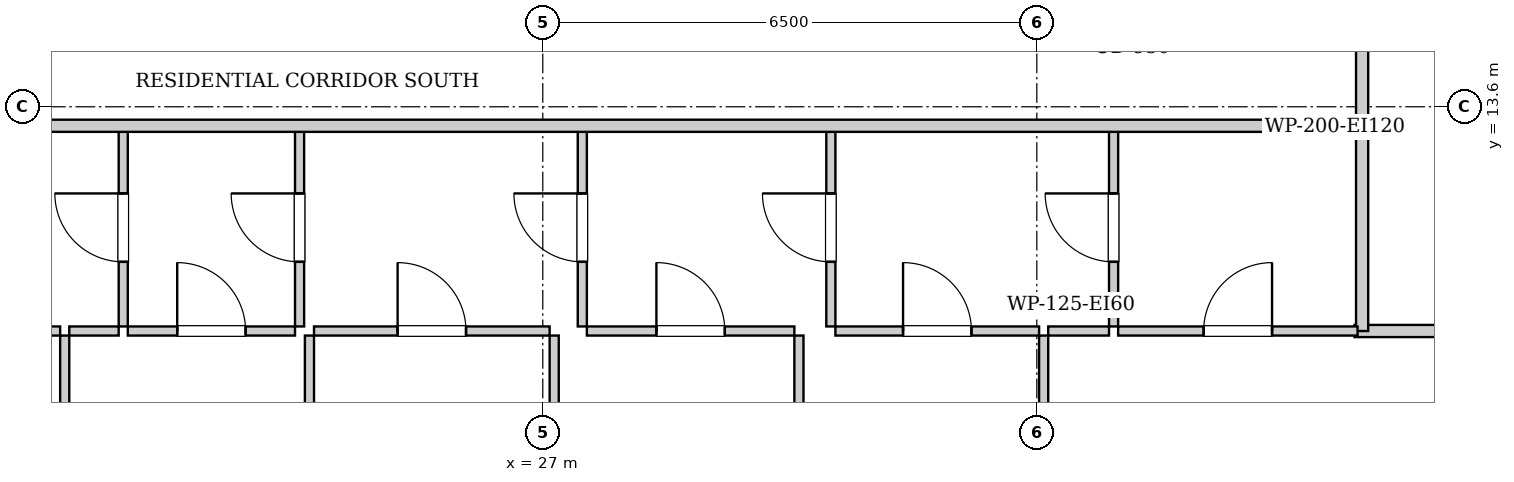
"""IFC4 building model, lengths in metres.
Left out: names, types, materials, properties, quantities, classifications, styles, units other than length and angle.
Written with IfcOpenShell. Run it as: python <this file> out.ifc"""

import sys

from ifc_helpers import new_model, si_unit, direction, frame, frame_2d, origin, place, context, subcontext, project, spatial, rectangle, extrude, element, fill, save


model = new_model("IFC4")
c1 = context("Model", 3, precision=1e-05, world=origin(), true_north=direction((0.0, 1.0)))
c2 = subcontext(c1, "Body", "Model", "MODEL_VIEW")
j1 = project(units=[si_unit("LENGTHUNIT", "METRE"), si_unit("PLANEANGLEUNIT", "RADIAN")], contexts=[c1])
p1 = place(None, origin())
s1 = spatial("IfcSite", under=j1, at=p1, CompositionType="ELEMENT")
p2 = place(p1, origin())
s2 = spatial("IfcBuilding", under=s1, at=p2, CompositionType="ELEMENT")
p3 = place(p2, frame((0.0, 0.0, 127.65)))
s3 = spatial("IfcBuildingStorey", under=s2, at=p3, CompositionType="ELEMENT", Elevation=127.65)
p4 = place(p3, frame((37.78, 13.35, 0.0), z_axis=(0.0, 0.0, 1.0), x_axis=(0.0, 1.0, 0.0)))
e1 = element("IfcWall", 1, at=p4, inside=s3, PredefinedType="PARTITIONING", context=c2, shape_type="SweptSolid", body=[
    extrude(rectangle(XDim=1.74, YDim=0.16, at=frame_2d((0.87, 0.0))), origin(), (0.0, 0.0, 1.0), 2.99),
])
p5 = place(p3, frame((37.68, 10.65, 0.0), z_axis=(0.0, 0.0, 1.0), x_axis=(1.0, 0.0, 0.0)))
e2 = element("IfcWall", 2, at=p5, inside=s3, PredefinedType="PARTITIONING", context=c2, shape_type="SweptSolid", body=[
    extrude(rectangle(XDim=2.34, YDim=0.16, at=frame_2d((1.17, 0.0))), origin(), (0.0, 0.0, 1.0), 2.99),
])
p6 = place(p3, frame((37.78, 10.65, 0.0), z_axis=(0.0, 0.0, 1.0), x_axis=(0.0, 1.0, 0.0)))
e3 = element("IfcWall", 3, at=p6, inside=s3, PredefinedType="PARTITIONING", context=c2, shape_type="SweptSolid", body=[
    extrude(rectangle(XDim=2.66, YDim=0.16, at=frame_2d((1.33, 0.0))), origin(), (0.0, 0.0, 1.0), 2.99),
])
p7 = place(p3, frame((21.48, 10.71, 0.0), z_axis=(0.0, 0.0, 1.0), x_axis=(0.0, 1.0, 0.0)))
e4 = element("IfcWall", 4, at=p7, inside=s3, PredefinedType="PARTITIONING", context=c2, shape_type="SweptSolid", body=[
    extrude(rectangle(XDim=2.6, YDim=0.12, at=frame_2d((1.3, 0.0))), origin(), (0.0, 0.0, 1.0), 2.99),
])
p8 = place(p7, frame((0.85, 0.0, 0.0)))
e5 = element("IfcOpeningElement", 5, at=p8, cuts=e4, PredefinedType="OPENING", context=c2, shape_type="SweptSolid", body=[
    extrude(rectangle(XDim=0.9, YDim=2.05, at=frame_2d((0.45, 1.025))), frame((0.0, 0.07, 0.0), z_axis=(0.0, -1.0, 0.0), x_axis=(1.0, 0.0, 0.0)), (0.0, 0.0, 1.0), 0.14),
])
p9 = place(p3, frame((19.22, 10.65, 0.0), z_axis=(0.0, 0.0, 1.0), x_axis=(1.0, 0.0, 0.0)))
e6 = element("IfcWall", 6, at=p9, inside=s3, PredefinedType="PARTITIONING", context=c2, shape_type="SweptSolid", body=[
    extrude(rectangle(XDim=1.43, YDim=0.12, at=frame_2d((0.715, 0.0))), origin(), (0.0, 0.0, 1.0), 2.99),
])
p10 = place(p9, frame((0.265, 0.0, 0.0)))
e7 = element("IfcOpeningElement", 7, at=p10, cuts=e6, PredefinedType="OPENING", context=c2, shape_type="SweptSolid", body=[
    extrude(rectangle(XDim=0.9, YDim=2.05, at=frame_2d((0.45, 1.025))), frame((0.0, 0.07, 0.0), z_axis=(0.0, -1.0, 0.0), x_axis=(1.0, 0.0, 0.0)), (0.0, 0.0, 1.0), 0.14),
])
p11 = place(p3, frame((20.77, 10.65, 0.0), z_axis=(0.0, 0.0, 1.0), x_axis=(1.0, 0.0, 0.0)))
e8 = element("IfcWall", 8, at=p11, inside=s3, PredefinedType="PARTITIONING", context=c2, shape_type="SweptSolid", body=[
    extrude(rectangle(XDim=0.65, YDim=0.12, at=frame_2d((0.325, 0.0))), origin(), (0.0, 0.0, 1.0), 2.99),
])
p12 = place(p3, frame((23.8, 10.71, 0.0), z_axis=(0.0, 0.0, 1.0), x_axis=(0.0, 1.0, 0.0)))
e9 = element("IfcWall", 9, at=p12, inside=s3, PredefinedType="PARTITIONING", context=c2, shape_type="SweptSolid", body=[
    extrude(rectangle(XDim=2.6, YDim=0.12, at=frame_2d((1.3, 0.0))), origin(), (0.0, 0.0, 1.0), 2.99),
])
p13 = place(p12, frame((0.85, 0.0, 0.0)))
e10 = element("IfcOpeningElement", 10, at=p13, cuts=e9, PredefinedType="OPENING", context=c2, shape_type="SweptSolid", body=[
    extrude(rectangle(XDim=0.9, YDim=2.05, at=frame_2d((0.45, 1.025))), frame((0.0, 0.07, 0.0), z_axis=(0.0, -1.0, 0.0), x_axis=(1.0, 0.0, 0.0)), (0.0, 0.0, 1.0), 0.14),
])
p14 = place(p3, frame((21.54, 10.65, 0.0), z_axis=(0.0, 0.0, 1.0), x_axis=(1.0, 0.0, 0.0)))
e11 = element("IfcWall", 11, at=p14, inside=s3, PredefinedType="PARTITIONING", context=c2, shape_type="SweptSolid", body=[
    extrude(rectangle(XDim=2.2, YDim=0.12, at=frame_2d((1.1, 0.0))), origin(), (0.0, 0.0, 1.0), 2.99),
])
p15 = place(p14, frame((0.65, 0.0, 0.0)))
e12 = element("IfcOpeningElement", 12, at=p15, cuts=e11, PredefinedType="OPENING", context=c2, shape_type="SweptSolid", body=[
    extrude(rectangle(XDim=0.9, YDim=2.05, at=frame_2d((0.45, 1.025))), frame((0.0, 0.07, 0.0), z_axis=(0.0, -1.0, 0.0), x_axis=(1.0, 0.0, 0.0)), (0.0, 0.0, 1.0), 0.14),
])
p16 = place(p3, frame((27.52, 10.71, 0.0), z_axis=(0.0, 0.0, 1.0), x_axis=(0.0, 1.0, 0.0)))
e13 = element("IfcWall", 13, at=p16, inside=s3, PredefinedType="PARTITIONING", context=c2, shape_type="SweptSolid", body=[
    extrude(rectangle(XDim=2.6, YDim=0.12, at=frame_2d((1.3, 0.0))), origin(), (0.0, 0.0, 1.0), 2.99),
])
p17 = place(p16, frame((0.85, 0.0, 0.0)))
e14 = element("IfcOpeningElement", 14, at=p17, cuts=e13, PredefinedType="OPENING", context=c2, shape_type="SweptSolid", body=[
    extrude(rectangle(XDim=0.9, YDim=2.05, at=frame_2d((0.45, 1.025))), frame((0.0, 0.07, 0.0), z_axis=(0.0, -1.0, 0.0), x_axis=(1.0, 0.0, 0.0)), (0.0, 0.0, 1.0), 0.14),
])
p18 = place(p3, frame((23.99, 10.65, 0.0), z_axis=(0.0, 0.0, 1.0), x_axis=(1.0, 0.0, 0.0)))
e15 = element("IfcWall", 15, at=p18, inside=s3, PredefinedType="PARTITIONING", context=c2, shape_type="SweptSolid", body=[
    extrude(rectangle(XDim=3.1, YDim=0.12, at=frame_2d((1.55, 0.0))), origin(), (0.0, 0.0, 1.0), 2.99),
])
p19 = place(p18, frame((1.1, 0.0, 0.0)))
e16 = element("IfcOpeningElement", 16, at=p19, cuts=e15, PredefinedType="OPENING", context=c2, shape_type="SweptSolid", body=[
    extrude(rectangle(XDim=0.9, YDim=2.05, at=frame_2d((0.45, 1.025))), frame((0.0, 0.07, 0.0), z_axis=(0.0, -1.0, 0.0), x_axis=(1.0, 0.0, 0.0)), (0.0, 0.0, 1.0), 0.14),
])
p20 = place(p3, frame((30.79, 10.71, 0.0), z_axis=(0.0, 0.0, 1.0), x_axis=(0.0, 1.0, 0.0)))
e17 = element("IfcWall", 17, at=p20, inside=s3, PredefinedType="PARTITIONING", context=c2, shape_type="SweptSolid", body=[
    extrude(rectangle(XDim=2.6, YDim=0.12, at=frame_2d((1.3, 0.0))), origin(), (0.0, 0.0, 1.0), 2.99),
])
p21 = place(p20, frame((0.85, 0.0, 0.0)))
e18 = element("IfcOpeningElement", 18, at=p21, cuts=e17, PredefinedType="OPENING", context=c2, shape_type="SweptSolid", body=[
    extrude(rectangle(XDim=0.9, YDim=2.05, at=frame_2d((0.45, 1.025))), frame((0.0, 0.07, 0.0), z_axis=(0.0, -1.0, 0.0), x_axis=(1.0, 0.0, 0.0)), (0.0, 0.0, 1.0), 0.14),
])
p22 = place(p3, frame((27.58, 10.65, 0.0), z_axis=(0.0, 0.0, 1.0), x_axis=(1.0, 0.0, 0.0)))
e19 = element("IfcWall", 19, at=p22, inside=s3, PredefinedType="PARTITIONING", context=c2, shape_type="SweptSolid", body=[
    extrude(rectangle(XDim=2.73, YDim=0.12, at=frame_2d((1.365, 0.0))), origin(), (0.0, 0.0, 1.0), 2.99),
])
p23 = place(p22, frame((0.915, 0.0, 0.0)))
e20 = element("IfcOpeningElement", 20, at=p23, cuts=e19, PredefinedType="OPENING", context=c2, shape_type="SweptSolid", body=[
    extrude(rectangle(XDim=0.9, YDim=2.05, at=frame_2d((0.45, 1.025))), frame((0.0, 0.07, 0.0), z_axis=(0.0, -1.0, 0.0), x_axis=(1.0, 0.0, 0.0)), (0.0, 0.0, 1.0), 0.14),
])
p24 = place(p3, frame((34.51, 10.71, 0.0), z_axis=(0.0, 0.0, 1.0), x_axis=(0.0, 1.0, 0.0)))
e21 = element("IfcWall", 21, at=p24, inside=s3, PredefinedType="PARTITIONING", context=c2, shape_type="SweptSolid", body=[
    extrude(rectangle(XDim=2.6, YDim=0.12, at=frame_2d((1.3, 0.0))), origin(), (0.0, 0.0, 1.0), 2.99),
])
p25 = place(p24, frame((0.85, 0.0, 0.0)))
e22 = element("IfcOpeningElement", 22, at=p25, cuts=e21, PredefinedType="OPENING", context=c2, shape_type="SweptSolid", body=[
    extrude(rectangle(XDim=0.9, YDim=2.05, at=frame_2d((0.45, 1.025))), frame((0.0, 0.07, 0.0), z_axis=(0.0, -1.0, 0.0), x_axis=(1.0, 0.0, 0.0)), (0.0, 0.0, 1.0), 0.14),
])
p26 = place(p3, frame((30.85, 10.65, 0.0), z_axis=(0.0, 0.0, 1.0), x_axis=(1.0, 0.0, 0.0)))
e23 = element("IfcWall", 23, at=p26, inside=s3, PredefinedType="PARTITIONING", context=c2, shape_type="SweptSolid", body=[
    extrude(rectangle(XDim=2.68, YDim=0.12, at=frame_2d((1.34, 0.0))), origin(), (0.0, 0.0, 1.0), 2.99),
])
p27 = place(p26, frame((0.89, 0.0, 0.0)))
e24 = element("IfcOpeningElement", 24, at=p27, cuts=e23, PredefinedType="OPENING", context=c2, shape_type="SweptSolid", body=[
    extrude(rectangle(XDim=0.9, YDim=2.05, at=frame_2d((0.45, 1.025))), frame((0.0, 0.07, 0.0), z_axis=(0.0, -1.0, 0.0), x_axis=(1.0, 0.0, 0.0)), (0.0, 0.0, 1.0), 0.14),
])
p28 = place(p3, frame((33.65, 10.65, 0.0), z_axis=(0.0, 0.0, 1.0), x_axis=(1.0, 0.0, 0.0)))
e25 = element("IfcWall", 25, at=p28, inside=s3, PredefinedType="PARTITIONING", context=c2, shape_type="SweptSolid", body=[
    extrude(rectangle(XDim=0.8, YDim=0.12, at=frame_2d((0.4, 0.0))), origin(), (0.0, 0.0, 1.0), 2.99),
])
p29 = place(p3, frame((34.57, 10.65, 0.0), z_axis=(0.0, 0.0, 1.0), x_axis=(1.0, 0.0, 0.0)))
e26 = element("IfcWall", 26, at=p29, inside=s3, PredefinedType="PARTITIONING", context=c2, shape_type="SweptSolid", body=[
    extrude(rectangle(XDim=3.15, YDim=0.12, at=frame_2d((1.575, 0.0))), origin(), (0.0, 0.0, 1.0), 2.99),
])
p30 = place(p29, frame((1.125, 0.0, 0.0)))
e27 = element("IfcOpeningElement", 27, at=p30, cuts=e26, PredefinedType="OPENING", context=c2, shape_type="SweptSolid", body=[
    extrude(rectangle(XDim=0.9, YDim=2.05, at=frame_2d((0.45, 1.025))), frame((0.0, 0.07, 0.0), z_axis=(0.0, -1.0, 0.0), x_axis=(1.0, 0.0, 0.0)), (0.0, 0.0, 1.0), 0.14),
])
p31 = place(p3, frame((20.71, 4.08, 0.0), z_axis=(0.0, 0.0, 1.0), x_axis=(0.0, 1.0, 0.0)))
e28 = element("IfcWall", 28, at=p31, inside=s3, PredefinedType="PARTITIONING", context=c2, shape_type="SweptSolid", body=[
    extrude(rectangle(XDim=6.51, YDim=0.12, at=frame_2d((3.255, 0.0))), origin(), (0.0, 0.0, 1.0), 2.99),
])
p32 = place(p31, frame((2.79, 0.0, 0.0)))
e29 = element("IfcOpeningElement", 29, at=p32, cuts=e28, PredefinedType="OPENING", context=c2, shape_type="SweptSolid", body=[
    extrude(rectangle(XDim=0.9, YDim=2.05, at=frame_2d((0.45, 1.025))), frame((0.0, 0.07, 0.0), z_axis=(0.0, -1.0, 0.0), x_axis=(1.0, 0.0, 0.0)), (0.0, 0.0, 1.0), 0.14),
])
p33 = place(p3, frame((23.93, 4.08, 0.0), z_axis=(0.0, 0.0, 1.0), x_axis=(0.0, 1.0, 0.0)))
e30 = element("IfcWall", 30, at=p33, inside=s3, PredefinedType="PARTITIONING", context=c2, shape_type="SweptSolid", body=[
    extrude(rectangle(XDim=6.51, YDim=0.12, at=frame_2d((3.255, 0.0))), origin(), (0.0, 0.0, 1.0), 2.99),
])
p34 = place(p33, frame((2.79, 0.0, 0.0)))
e31 = element("IfcOpeningElement", 31, at=p34, cuts=e30, PredefinedType="OPENING", context=c2, shape_type="SweptSolid", body=[
    extrude(rectangle(XDim=0.9, YDim=2.05, at=frame_2d((0.45, 1.025))), frame((0.0, 0.07, 0.0), z_axis=(0.0, -1.0, 0.0), x_axis=(1.0, 0.0, 0.0)), (0.0, 0.0, 1.0), 0.14),
])
p35 = place(p3, frame((27.15, 4.08, 0.0), z_axis=(0.0, 0.0, 1.0), x_axis=(0.0, 1.0, 0.0)))
e32 = element("IfcWall", 32, at=p35, inside=s3, PredefinedType="PARTITIONING", context=c2, shape_type="SweptSolid", body=[
    extrude(rectangle(XDim=6.51, YDim=0.12, at=frame_2d((3.255, 0.0))), origin(), (0.0, 0.0, 1.0), 2.99),
])
p36 = place(p35, frame((2.79, 0.0, 0.0)))
e33 = element("IfcOpeningElement", 33, at=p36, cuts=e32, PredefinedType="OPENING", context=c2, shape_type="SweptSolid", body=[
    extrude(rectangle(XDim=0.9, YDim=2.05, at=frame_2d((0.45, 1.025))), frame((0.0, 0.07, 0.0), z_axis=(0.0, -1.0, 0.0), x_axis=(1.0, 0.0, 0.0)), (0.0, 0.0, 1.0), 0.14),
])
p37 = place(p3, frame((30.37, 4.08, 0.0), z_axis=(0.0, 0.0, 1.0), x_axis=(0.0, 1.0, 0.0)))
e34 = element("IfcWall", 34, at=p37, inside=s3, PredefinedType="PARTITIONING", context=c2, shape_type="SweptSolid", body=[
    extrude(rectangle(XDim=6.51, YDim=0.12, at=frame_2d((3.255, 0.0))), origin(), (0.0, 0.0, 1.0), 2.99),
])
p38 = place(p37, frame((2.79, 0.0, 0.0)))
e35 = element("IfcOpeningElement", 35, at=p38, cuts=e34, PredefinedType="OPENING", context=c2, shape_type="SweptSolid", body=[
    extrude(rectangle(XDim=0.9, YDim=2.05, at=frame_2d((0.45, 1.025))), frame((0.0, 0.07, 0.0), z_axis=(0.0, -1.0, 0.0), x_axis=(1.0, 0.0, 0.0)), (0.0, 0.0, 1.0), 0.14),
])
p39 = place(p3, frame((33.59, 6.23, 0.0), z_axis=(0.0, 0.0, 1.0), x_axis=(0.0, 1.0, 0.0)))
e36 = element("IfcWall", 36, at=p39, inside=s3, PredefinedType="PARTITIONING", context=c2, shape_type="SweptSolid", body=[
    extrude(rectangle(XDim=4.36, YDim=0.12, at=frame_2d((2.18, 0.0))), origin(), (0.0, 0.0, 1.0), 2.99),
])
p40 = place(p39, frame((1.73, 0.0, 0.0)))
e37 = element("IfcOpeningElement", 37, at=p40, cuts=e36, PredefinedType="OPENING", context=c2, shape_type="SweptSolid", body=[
    extrude(rectangle(XDim=0.9, YDim=2.05, at=frame_2d((0.45, 1.025))), frame((0.0, 0.07, 0.0), z_axis=(0.0, -1.0, 0.0), x_axis=(1.0, 0.0, 0.0)), (0.0, 0.0, 1.0), 0.14),
])
p41 = place(p3, frame((10.05, 13.35, 0.0), z_axis=(0.0, 0.0, 1.0), x_axis=(1.0, 0.0, 0.0)))
e38 = element("IfcWall", 38, at=p41, inside=s3, PredefinedType="PARTITIONING", context=c2, shape_type="SweptSolid", body=[
    extrude(rectangle(XDim=27.7, YDim=0.16, at=frame_2d((13.85, 0.0))), origin(), (0.0, 0.0, 1.0), 2.99),
])
p42 = place(p41, frame((4.165, 0.0, 0.0)))
e39 = element("IfcOpeningElement", 39, at=p42, cuts=e38, PredefinedType="OPENING", context=c2, shape_type="SweptSolid", body=[
    extrude(rectangle(XDim=0.95, YDim=2.1, at=frame_2d((0.475, 1.05))), frame((0.0, 0.09, 0.0), z_axis=(0.0, -1.0, 0.0), x_axis=(1.0, 0.0, 0.0)), (0.0, 0.0, 1.0), 0.18),
])
p43 = place(p8, origin())
e40 = element("IfcDoor", 40, at=p43, inside=s3, OperationType="SINGLE_SWING_RIGHT", PredefinedType="DOOR", context=c2, shape_type="SweptSolid", body=[
    extrude(rectangle(XDim=0.9, YDim=2.05, at=frame_2d((0.45, 1.025))), frame((0.0, 0.025, 0.0), z_axis=(0.0, -1.0, 0.0), x_axis=(1.0, 0.0, 0.0)), (0.0, 0.0, 1.0), 0.05),
])
fill(e5, e40)
p44 = place(p13, origin())
e41 = element("IfcDoor", 41, at=p44, inside=s3, OperationType="SINGLE_SWING_RIGHT", PredefinedType="DOOR", context=c2, shape_type="SweptSolid", body=[
    extrude(rectangle(XDim=0.9, YDim=2.05, at=frame_2d((0.45, 1.025))), frame((0.0, 0.025, 0.0), z_axis=(0.0, -1.0, 0.0), x_axis=(1.0, 0.0, 0.0)), (0.0, 0.0, 1.0), 0.05),
])
fill(e10, e41)
p45 = place(p15, origin())
e42 = element("IfcDoor", 42, at=p45, inside=s3, OperationType="SINGLE_SWING_LEFT", PredefinedType="DOOR", context=c2, shape_type="SweptSolid", body=[
    extrude(rectangle(XDim=0.9, YDim=2.05, at=frame_2d((0.45, 1.025))), frame((0.0, 0.025, 0.0), z_axis=(0.0, -1.0, 0.0), x_axis=(1.0, 0.0, 0.0)), (0.0, 0.0, 1.0), 0.05),
])
fill(e12, e42)
p46 = place(p17, origin())
e43 = element("IfcDoor", 43, at=p46, inside=s3, OperationType="SINGLE_SWING_RIGHT", PredefinedType="DOOR", context=c2, shape_type="SweptSolid", body=[
    extrude(rectangle(XDim=0.9, YDim=2.05, at=frame_2d((0.45, 1.025))), frame((0.0, 0.025, 0.0), z_axis=(0.0, -1.0, 0.0), x_axis=(1.0, 0.0, 0.0)), (0.0, 0.0, 1.0), 0.05),
])
fill(e14, e43)
p47 = place(p19, origin())
e44 = element("IfcDoor", 44, at=p47, inside=s3, OperationType="SINGLE_SWING_LEFT", PredefinedType="DOOR", context=c2, shape_type="SweptSolid", body=[
    extrude(rectangle(XDim=0.9, YDim=2.05, at=frame_2d((0.45, 1.025))), frame((0.0, 0.025, 0.0), z_axis=(0.0, -1.0, 0.0), x_axis=(1.0, 0.0, 0.0)), (0.0, 0.0, 1.0), 0.05),
])
fill(e16, e44)
p48 = place(p21, origin())
e45 = element("IfcDoor", 45, at=p48, inside=s3, OperationType="SINGLE_SWING_RIGHT", PredefinedType="DOOR", context=c2, shape_type="SweptSolid", body=[
    extrude(rectangle(XDim=0.9, YDim=2.05, at=frame_2d((0.45, 1.025))), frame((0.0, 0.025, 0.0), z_axis=(0.0, -1.0, 0.0), x_axis=(1.0, 0.0, 0.0)), (0.0, 0.0, 1.0), 0.05),
])
fill(e18, e45)
p49 = place(p23, origin())
e46 = element("IfcDoor", 46, at=p49, inside=s3, OperationType="SINGLE_SWING_LEFT", PredefinedType="DOOR", context=c2, shape_type="SweptSolid", body=[
    extrude(rectangle(XDim=0.9, YDim=2.05, at=frame_2d((0.45, 1.025))), frame((0.0, 0.025, 0.0), z_axis=(0.0, -1.0, 0.0), x_axis=(1.0, 0.0, 0.0)), (0.0, 0.0, 1.0), 0.05),
])
fill(e20, e46)
p50 = place(p25, origin())
e47 = element("IfcDoor", 47, at=p50, inside=s3, OperationType="SINGLE_SWING_RIGHT", PredefinedType="DOOR", context=c2, shape_type="SweptSolid", body=[
    extrude(rectangle(XDim=0.9, YDim=2.05, at=frame_2d((0.45, 1.025))), frame((0.0, 0.025, 0.0), z_axis=(0.0, -1.0, 0.0), x_axis=(1.0, 0.0, 0.0)), (0.0, 0.0, 1.0), 0.05),
])
fill(e22, e47)
p51 = place(p27, origin())
e48 = element("IfcDoor", 48, at=p51, inside=s3, OperationType="SINGLE_SWING_LEFT", PredefinedType="DOOR", context=c2, shape_type="SweptSolid", body=[
    extrude(rectangle(XDim=0.9, YDim=2.05, at=frame_2d((0.45, 1.025))), frame((0.0, 0.025, 0.0), z_axis=(0.0, -1.0, 0.0), x_axis=(1.0, 0.0, 0.0)), (0.0, 0.0, 1.0), 0.05),
])
fill(e24, e48)
p52 = place(p30, origin())
e49 = element("IfcDoor", 49, at=p52, inside=s3, OperationType="SINGLE_SWING_RIGHT", PredefinedType="DOOR", context=c2, shape_type="SweptSolid", body=[
    extrude(rectangle(XDim=0.9, YDim=2.05, at=frame_2d((0.45, 1.025))), frame((0.0, 0.025, 0.0), z_axis=(0.0, -1.0, 0.0), x_axis=(1.0, 0.0, 0.0)), (0.0, 0.0, 1.0), 0.05),
])
fill(e27, e49)
save(model, sys.argv[1])
